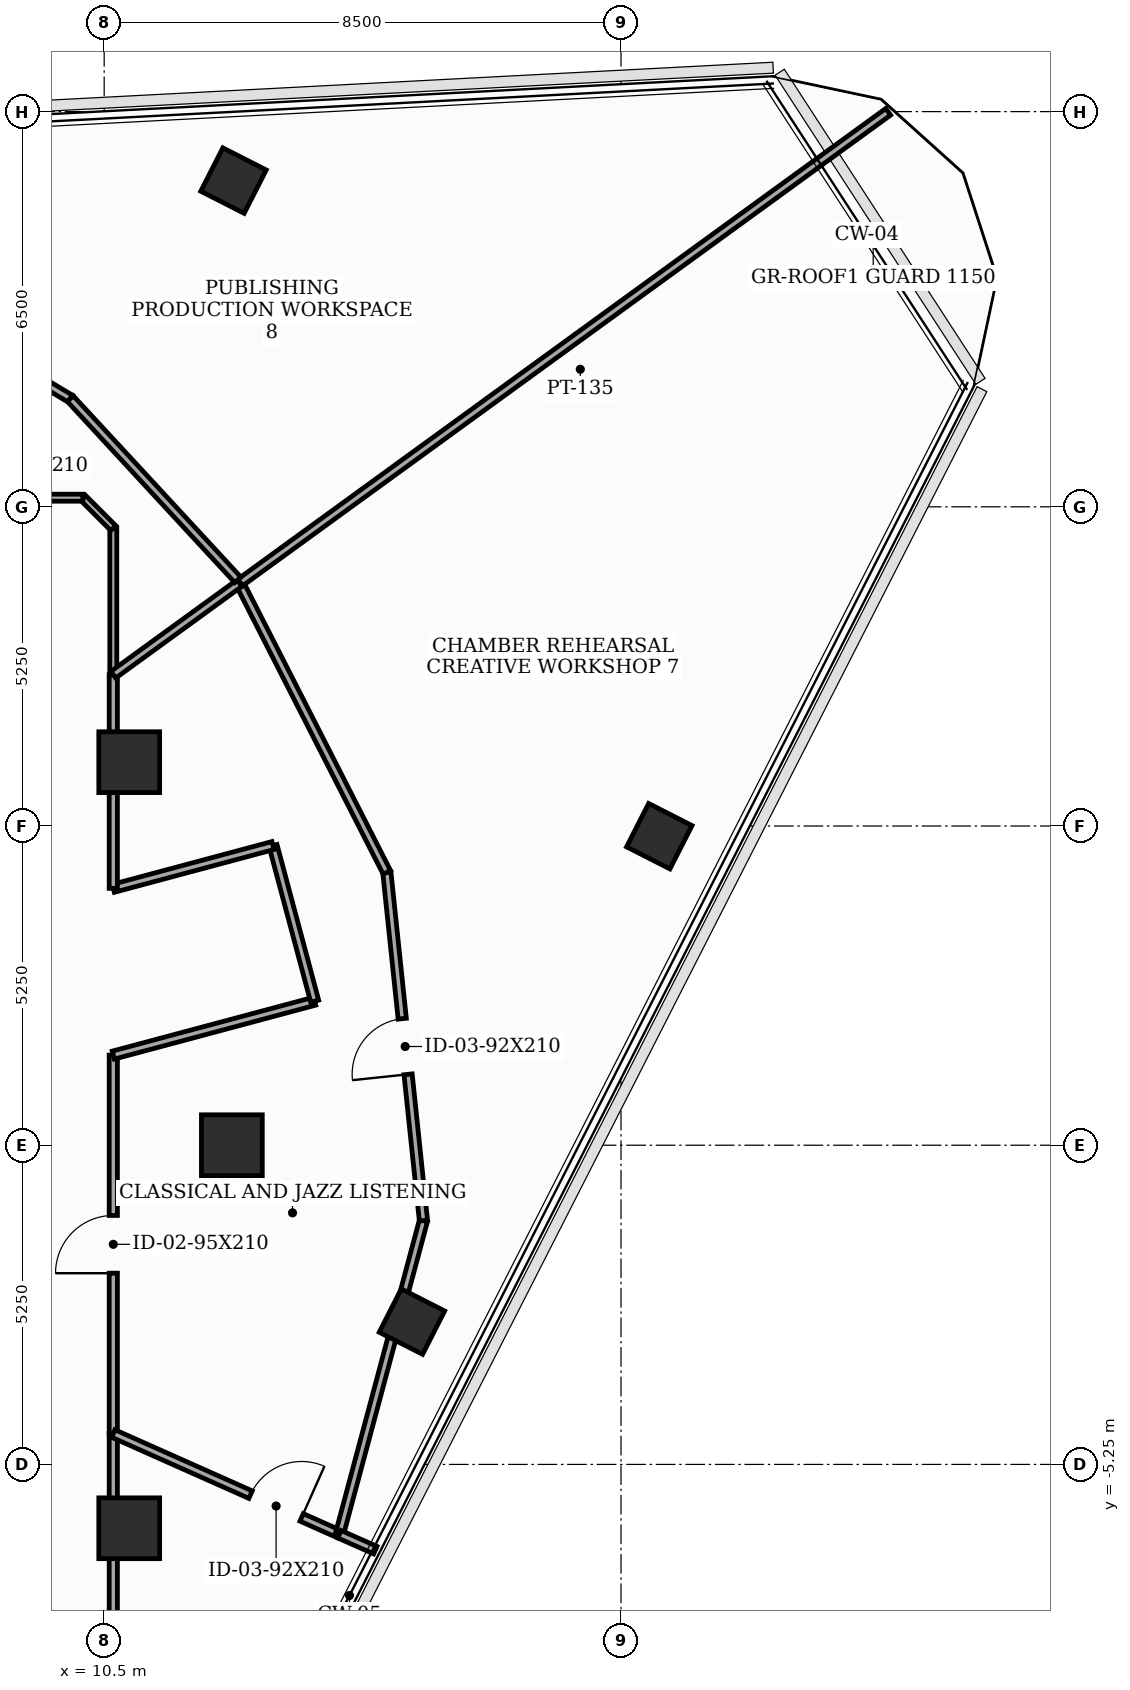
"""IFC4 building model, lengths in metres.
Left out: names, types, materials, properties, quantities, classifications, styles, units other than length and angle.
Written with IfcOpenShell. Run it as: python <this file> out.ifc"""

import sys

from ifc_helpers import new_model, si_unit, direction, frame, frame_2d, origin, origin_2d, place, context, subcontext, project, spatial, rectangle, extrude, element, fill, save


model = new_model("IFC4")
c1 = context("Model", 3, precision=1e-05, world=origin(), true_north=direction((0.0, 1.0)))
c2 = subcontext(c1, "Body", "Model", "MODEL_VIEW")
j1 = project(units=[si_unit("LENGTHUNIT", "METRE"), si_unit("PLANEANGLEUNIT", "RADIAN")], contexts=[c1])
p1 = place(None, origin())
s1 = spatial("IfcSite", under=j1, at=p1, CompositionType="ELEMENT")
p2 = place(p1, origin())
s2 = spatial("IfcBuilding", under=s1, at=p2, CompositionType="ELEMENT")
p3 = place(p2, frame((0.0, 0.0, 255.9)))
s3 = spatial("IfcBuildingStorey", under=s2, at=p3, CompositionType="ELEMENT", Elevation=255.9)
for number, where, z_axis, x_axis in (
    (1, (12.6, 0.0, 0.0), (0.0, 0.0, 1.0), (1.0, 0.0, 0.0)),
    (2, (10.912, 6.3, 0.0), (0.0, 0.0, 1.0), (1.0, 0.0, 0.0)),
    (3, (10.912, -6.3, 0.0), (0.0, 0.0, 1.0), (1.0, 0.0, 0.0)),
):
    element("IfcColumn", number, at=place(p3, frame(where, z_axis=z_axis, x_axis=x_axis)), inside=s3, PredefinedType="COLUMN", context=c2, shape_type="SweptSolid", body=[
        extrude(rectangle(XDim=1.0, YDim=1.0, at=origin_2d()), origin(), (0.0, 0.0, 1.0), 3.7),
    ])
for number, where, z_axis, x_axis in (
    (4, (15.562, -2.901, 0.0), (0.0, 0.0, 1.0), (0.454, 0.891, 0.0)),
    (5, (19.629, 5.082, 0.0), (0.0, 0.0, 1.0), (0.454, 0.891, 0.0)),
    (6, (12.627, 15.865, 0.0), (0.0, 0.0, 1.0), (0.454, 0.891, 0.0)),
):
    element("IfcColumn", number, at=place(p3, frame(where, z_axis=z_axis, x_axis=x_axis)), inside=s3, PredefinedType="COLUMN", context=c2, shape_type="SweptSolid", body=[
        extrude(rectangle(XDim=0.8, YDim=0.8, at=origin_2d()), origin(), (0.0, 0.0, 1.0), 3.7),
    ])
p4 = place(p3, frame((10.65, -4.742, 0.0), z_axis=(0.0, 0.0, 1.0), x_axis=(0.0, 1.0, 0.0)))
e7 = element("IfcWall", 7, at=p4, inside=s3, PredefinedType="PARTITIONING", context=c2, shape_type="SweptSolid", body=[
    extrude(rectangle(XDim=6.224, YDim=0.135, at=frame_2d((3.112, 0.0))), origin(), (0.0, 0.0, 1.0), 2.885),
])
p5 = place(p4, frame((2.637, 0.0, 0.0)))
e8 = element("IfcOpeningElement", 8, at=p5, cuts=e7, PredefinedType="OPENING", context=c2, shape_type="SweptSolid", body=[
    extrude(rectangle(XDim=0.95, YDim=2.1, at=frame_2d((0.475, 1.05))), frame((0.0, 0.077, 0.0), z_axis=(0.0, -1.0, 0.0), x_axis=(1.0, 0.0, 0.0)), (0.0, 0.0, 1.0), 0.155),
])
p6 = place(p3, frame((10.65, 1.482, 0.0), z_axis=(0.0, 0.0, 1.0), x_axis=(0.965961397105, 0.2586862565, 0.0)))
e9 = element("IfcWall", 9, at=p6, inside=s3, PredefinedType="PARTITIONING", context=c2, shape_type="SweptSolid", body=[
    extrude(rectangle(XDim=3.429, YDim=0.135, at=frame_2d((1.714, 0.0))), origin(), (0.0, 0.0, 1.0), 2.885),
])
p7 = place(p3, frame((13.962, 2.369, 0.0), z_axis=(0.0, 0.0, 1.0), x_axis=(-0.258413725385, 0.966034340245, 0.0)))
e10 = element("IfcWall", 10, at=p7, inside=s3, PredefinedType="PARTITIONING", context=c2, shape_type="SweptSolid", body=[
    extrude(rectangle(XDim=2.65, YDim=0.135, at=frame_2d((1.325, 0.0))), origin(), (0.0, 0.0, 1.0), 3.5),
])
p8 = place(p3, frame((13.277, 4.929, 0.0), z_axis=(0.0, 0.0, 1.0), x_axis=(-0.965934830229, -0.258785439601, 0.0)))
e11 = element("IfcWall", 11, at=p8, inside=s3, PredefinedType="PARTITIONING", context=c2, shape_type="SweptSolid", body=[
    extrude(rectangle(XDim=2.72, YDim=0.135, at=frame_2d((1.36, 0.0))), origin(), (0.0, 0.0, 1.0), 2.885),
])
p9 = place(p3, frame((10.65, 4.225, 0.0), z_axis=(0.0, 0.0, 1.0), x_axis=(0.0, 1.0, 0.0)))
e12 = element("IfcWall", 12, at=p9, inside=s3, PredefinedType="PARTITIONING", context=c2, shape_type="SweptSolid", body=[
    extrude(rectangle(XDim=3.513, YDim=0.135, at=frame_2d((1.756, 0.0))), origin(), (0.0, 0.0, 1.0), 2.885),
])
p10 = place(p3, frame((10.65, -10.15, 0.0), z_axis=(0.0, 0.0, 1.0), x_axis=(0.0, 1.0, 0.0)))
e13 = element("IfcWall", 13, at=p10, inside=s3, PredefinedType="PARTITIONING", context=c2, shape_type="SweptSolid", body=[
    extrude(rectangle(XDim=5.408, YDim=0.135, at=frame_2d((2.704, 0.0))), origin(), (0.0, 0.0, 1.0), 2.885),
])
p11 = place(p3, frame((10.65, 7.738, 0.0), z_axis=(0.0, 0.0, 1.0), x_axis=(0.0, 1.0, 0.0)))
e14 = element("IfcWall", 14, at=p11, inside=s3, PredefinedType="PARTITIONING", context=c2, shape_type="SweptSolid", body=[
    extrude(rectangle(XDim=2.412, YDim=0.115, at=frame_2d((1.206, 0.0))), origin(), (0.0, 0.0, 1.0), 3.5),
])
p12 = place(p3, frame((10.65, 10.15, 0.0), z_axis=(0.0, 0.0, 1.0), x_axis=(-0.707106781187, 0.707106781187, 0.0)))
e15 = element("IfcWall", 15, at=p12, inside=s3, PredefinedType="PARTITIONING", context=c2, shape_type="SweptSolid", body=[
    extrude(rectangle(XDim=0.707, YDim=0.115, at=frame_2d((0.354, 0.0))), origin(), (0.0, 0.0, 1.0), 3.5),
])
p13 = place(p3, frame((10.15, 10.65, 0.0), z_axis=(0.0, 0.0, 1.0), x_axis=(-1.0, 0.0, 0.0)))
e16 = element("IfcWall", 16, at=p13, inside=s3, PredefinedType="PARTITIONING", context=c2, shape_type="SweptSolid", body=[
    extrude(rectangle(XDim=5.408, YDim=0.115, at=frame_2d((2.704, 0.0))), origin(), (0.0, 0.0, 1.0), 2.885),
])
p14 = place(p13, frame((0.607, 0.0, 0.0)))
e17 = element("IfcOpeningElement", 17, at=p14, cuts=e16, PredefinedType="OPENING", context=c2, shape_type="SweptSolid", body=[
    extrude(rectangle(XDim=0.95, YDim=2.1, at=frame_2d((0.475, 1.05))), frame((0.0, 0.067, 0.0), z_axis=(0.0, -1.0, 0.0), x_axis=(1.0, 0.0, 0.0)), (0.0, 0.0, 1.0), 0.135),
])
p15 = place(p3, frame((10.65, -4.742, 0.0), z_axis=(0.0, 0.0, 1.0), x_axis=(0.913526929547, -0.406778255309, 0.0)))
e18 = element("IfcWall", 18, at=p15, inside=s3, PredefinedType="PARTITIONING", context=c2, shape_type="SweptSolid", body=[
    extrude(rectangle(XDim=4.071, YDim=0.135, at=frame_2d((2.036, 0.0))), origin(), (0.0, 0.0, 1.0), 2.885),
])
p16 = place(p15, frame((2.471, 0.0, 0.0)))
e19 = element("IfcOpeningElement", 19, at=p16, cuts=e18, PredefinedType="OPENING", context=c2, shape_type="SweptSolid", body=[
    extrude(rectangle(XDim=0.92, YDim=2.1, at=frame_2d((0.46, 1.05))), frame((0.0, 0.077, 0.0), z_axis=(0.0, -1.0, 0.0), x_axis=(1.0, 0.0, 0.0)), (0.0, 0.0, 1.0), 0.155),
])
p17 = place(p3, frame((14.369, -6.398, 0.0), z_axis=(0.0, 0.0, 1.0), x_axis=(0.258820640976, 0.965925398675, 0.0)))
e20 = element("IfcWall", 20, at=p17, inside=s3, PredefinedType="PARTITIONING", context=c2, shape_type="SweptSolid", body=[
    extrude(rectangle(XDim=5.34, YDim=0.135, at=frame_2d((2.67, 0.0))), origin(), (0.0, 0.0, 1.0), 3.035),
])
p18 = place(p3, frame((15.751, -1.24, 0.0), z_axis=(0.0, 0.0, 1.0), x_axis=(-0.104547955553, 0.994519846453, 0.0)))
e21 = element("IfcWall", 21, at=p18, inside=s3, PredefinedType="PARTITIONING", context=c2, shape_type="SweptSolid", body=[
    extrude(rectangle(XDim=5.759, YDim=0.135, at=frame_2d((2.879, 0.0))), origin(), (0.0, 0.0, 1.0), 3.035),
])
p19 = place(p18, frame((2.419, 0.0, 0.0)))
e22 = element("IfcOpeningElement", 22, at=p19, cuts=e21, PredefinedType="OPENING", context=c2, shape_type="SweptSolid", body=[
    extrude(rectangle(XDim=0.92, YDim=2.1, at=frame_2d((0.46, 1.05))), frame((0.0, 0.077, 0.0), z_axis=(0.0, -1.0, 0.0), x_axis=(1.0, 0.0, 0.0)), (0.0, 0.0, 1.0), 0.155),
])
p20 = place(p3, frame((15.149, 4.487, 0.0), z_axis=(0.0, 0.0, 1.0), x_axis=(-0.453912768225, 0.891046126102, 0.0)))
e23 = element("IfcWall", 23, at=p20, inside=s3, PredefinedType="PARTITIONING", context=c2, shape_type="SweptSolid", body=[
    extrude(rectangle(XDim=5.34, YDim=0.135, at=frame_2d((2.67, 0.0))), origin(), (0.0, 0.0, 1.0), 3.185),
])
p21 = place(p3, frame((12.725, 9.245, 0.0), z_axis=(0.0, 0.0, 1.0), x_axis=(-0.809135191367, -0.587622533683, 0.0)))
e24 = element("IfcWall", 24, at=p21, inside=s3, PredefinedType="PARTITIONING", context=c2, shape_type="SweptSolid", body=[
    extrude(rectangle(XDim=2.565, YDim=0.135, at=frame_2d((1.282, 0.0))), origin(), (0.0, 0.0, 1.0), 3.185),
])
p22 = place(p3, frame((14.959, -6.66, 0.0), z_axis=(0.0, 0.0, 1.0), x_axis=(-0.913967286969, 0.405787873586, 0.0)))
e25 = element("IfcWall", 25, at=p22, inside=s3, PredefinedType="PARTITIONING", context=c2, shape_type="SweptSolid", body=[
    extrude(rectangle(XDim=0.646, YDim=0.135, at=frame_2d((0.323, 0.0))), origin(), (0.0, 0.0, 1.0), 3.5),
])
p23 = place(p3, frame((23.394, 16.997, 0.0), z_axis=(0.0, 0.0, 1.0), x_axis=(-0.80901413128, -0.587789192985, 0.0)))
e26 = element("IfcWall", 26, at=p23, inside=s3, PredefinedType="PARTITIONING", context=c2, shape_type="SweptSolid", body=[
    extrude(rectangle(XDim=13.171, YDim=0.135, at=frame_2d((6.586, 0.0))), origin(), (0.0, 0.0, 1.0), 3.035),
])
p24 = place(p3, frame((6.404, 14.384, 0.0), z_axis=(0.0, 0.0, 1.0), x_axis=(0.859464079119, -0.511196143085, 0.0)))
e27 = element("IfcWall", 27, at=p24, inside=s3, PredefinedType="PARTITIONING", context=c2, shape_type="SweptSolid", body=[
    extrude(rectangle(XDim=4.118, YDim=0.135, at=frame_2d((2.059, 0.0))), origin(), (0.0, 0.0, 1.0), 3.035),
])
p25 = place(p24, frame((1.599, 0.0, 0.0)))
e28 = element("IfcOpeningElement", 28, at=p25, cuts=e27, PredefinedType="OPENING", context=c2, shape_type="SweptSolid", body=[
    extrude(rectangle(XDim=0.92, YDim=2.1, at=frame_2d((0.46, 1.05))), frame((0.0, 0.077, 0.0), z_axis=(0.0, -1.0, 0.0), x_axis=(1.0, 0.0, 0.0)), (0.0, 0.0, 1.0), 0.155),
])
p26 = place(p3, frame((9.943, 12.279, 0.0), z_axis=(0.0, 0.0, 1.0), x_axis=(0.678829604912, -0.734295831049, 0.0)))
e29 = element("IfcWall", 29, at=p26, inside=s3, PredefinedType="PARTITIONING", context=c2, shape_type="SweptSolid", body=[
    extrude(rectangle(XDim=4.058, YDim=0.135, at=frame_2d((2.029, 0.0))), origin(), (0.0, 0.0, 1.0), 3.185),
])
p27 = place(p5, origin())
e30 = element("IfcDoor", 30, at=p27, inside=s3, OperationType="SINGLE_SWING_LEFT", PredefinedType="DOOR", context=c2, shape_type="SweptSolid", body=[
    extrude(rectangle(XDim=0.95, YDim=2.1, at=frame_2d((0.475, 1.05))), frame((0.0, 0.025, 0.0), z_axis=(0.0, -1.0, 0.0), x_axis=(1.0, 0.0, 0.0)), (0.0, 0.0, 1.0), 0.05),
])
fill(e8, e30)
p28 = place(p16, origin())
e31 = element("IfcDoor", 31, at=p28, inside=s3, OperationType="SINGLE_SWING_RIGHT", PredefinedType="DOOR", context=c2, shape_type="SweptSolid", body=[
    extrude(rectangle(XDim=0.92, YDim=2.1, at=frame_2d((0.46, 1.05))), frame((0.0, 0.025, 0.0), z_axis=(0.0, -1.0, 0.0), x_axis=(1.0, 0.0, 0.0)), (0.0, 0.0, 1.0), 0.05),
])
fill(e19, e31)
p29 = place(p19, origin())
e32 = element("IfcDoor", 32, at=p29, inside=s3, OperationType="SINGLE_SWING_LEFT", PredefinedType="DOOR", context=c2, shape_type="SweptSolid", body=[
    extrude(rectangle(XDim=0.92, YDim=2.1, at=frame_2d((0.46, 1.05))), frame((0.0, 0.025, 0.0), z_axis=(0.0, -1.0, 0.0), x_axis=(1.0, 0.0, 0.0)), (0.0, 0.0, 1.0), 0.05),
])
fill(e22, e32)
save(model, sys.argv[1])
